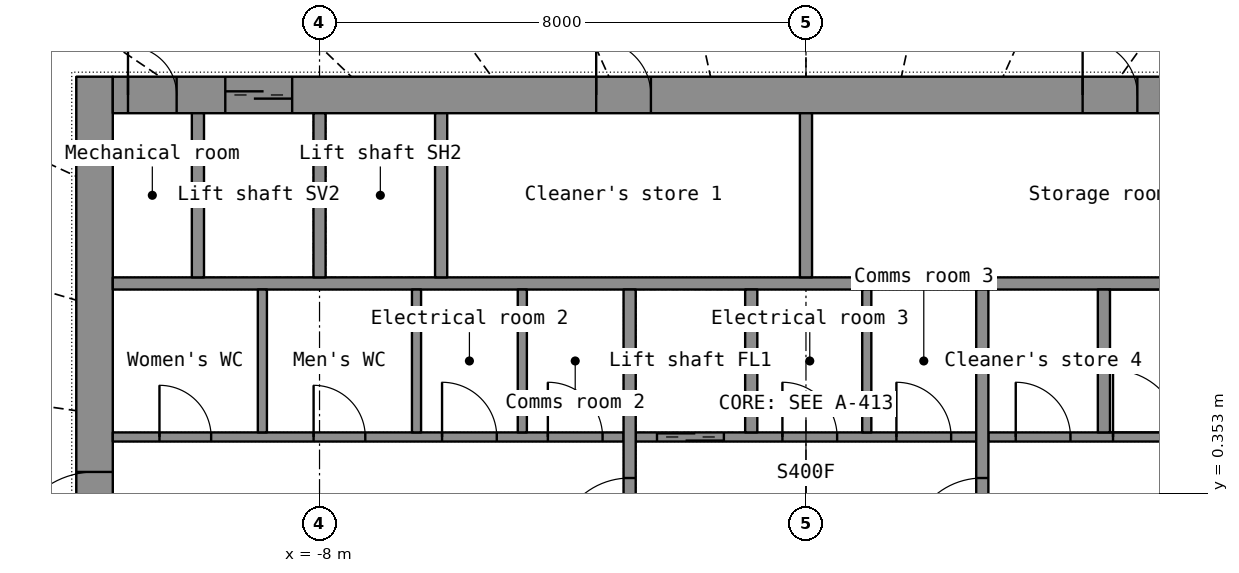
"""IFC4 building model, lengths in metres.
Left out: names, types, materials, properties, quantities, classifications, styles, units other than length and angle.
Written with IfcOpenShell. Run it as: python <this file> out.ifc"""

import sys

from ifc_helpers import new_model, si_unit, direction, frame, frame_2d, origin, place, context, subcontext, project, spatial, rectangle, extrude, element, fill, save


model = new_model("IFC4")
c1 = context("Model", 3, precision=1e-05, world=origin(), true_north=direction((0.0, 1.0)))
c2 = subcontext(c1, "Body", "Model", "MODEL_VIEW")
j1 = project(units=[si_unit("LENGTHUNIT", "METRE"), si_unit("PLANEANGLEUNIT", "RADIAN")], contexts=[c1])
p1 = place(None, origin())
s1 = spatial("IfcSite", under=j1, at=p1, CompositionType="ELEMENT")
p2 = place(p1, origin())
s2 = spatial("IfcBuilding", under=s1, at=p2, CompositionType="ELEMENT")
p3 = place(p2, frame((0.0, 0.0, 85.2)))
s3 = spatial("IfcBuildingStorey", under=s2, at=p3, CompositionType="ELEMENT", Elevation=85.2)
p4 = place(p3, frame((-11.7, -7.2, 0.0), z_axis=(0.0, 0.0, 1.0), x_axis=(0.0, 1.0, 0.0)))
e1 = element("IfcWall", 1, at=p4, inside=s3, PredefinedType="SHEAR", context=c2, shape_type="SweptSolid", body=[
    extrude(rectangle(XDim=14.4, YDim=0.6, at=frame_2d((7.2, 0.0))), origin(), (0.0, 0.0, 1.0), 7.0),
])
p5 = place(p4, frame((6.5, 0.0, 0.0)))
e2 = element("IfcOpeningElement", 2, at=p5, cuts=e1, PredefinedType="OPENING", context=c2, shape_type="SweptSolid", body=[
    extrude(rectangle(XDim=1.4, YDim=2.2, at=frame_2d((0.7, 1.1))), frame((0.0, 0.31, 0.0), z_axis=(0.0, -1.0, 0.0), x_axis=(1.0, 0.0, 0.0)), (0.0, 0.0, 1.0), 0.62),
])
p6 = place(p3, frame((-11.4, 6.9, 0.0), z_axis=(0.0, 0.0, 1.0), x_axis=(1.0, 0.0, 0.0)))
e3 = element("IfcWall", 3, at=p6, inside=s3, PredefinedType="SHEAR", context=c2, shape_type="SweptSolid", body=[
    extrude(rectangle(XDim=22.8, YDim=0.6, at=frame_2d((11.4, 0.0))), origin(), (0.0, 0.0, 1.0), 7.0),
])
p7 = place(p6, frame((1.85, 0.0, 0.0)))
e4 = element("IfcOpeningElement", 4, at=p7, cuts=e3, PredefinedType="OPENING", context=c2, shape_type="SweptSolid", body=[
    extrude(rectangle(XDim=1.1, YDim=2.2, at=frame_2d((0.55, 1.1))), frame((0.0, 0.31, 0.0), z_axis=(0.0, -1.0, 0.0), x_axis=(1.0, 0.0, 0.0)), (0.0, 0.0, 1.0), 0.62),
])
p8 = place(p6, frame((7.95, 0.0, 0.0)))
e5 = element("IfcOpeningElement", 5, at=p8, cuts=e3, PredefinedType="OPENING", context=c2, shape_type="SweptSolid", body=[
    extrude(rectangle(XDim=0.9, YDim=2.1, at=frame_2d((0.45, 1.05))), frame((0.0, 0.31, 0.0), z_axis=(0.0, -1.0, 0.0), x_axis=(1.0, 0.0, 0.0)), (0.0, 0.0, 1.0), 0.62),
])
p9 = place(p6, frame((15.95, 0.0, 0.0)))
e6 = element("IfcOpeningElement", 6, at=p9, cuts=e3, PredefinedType="OPENING", context=c2, shape_type="SweptSolid", body=[
    extrude(rectangle(XDim=0.9, YDim=2.1, at=frame_2d((0.45, 1.05))), frame((0.0, 0.31, 0.0), z_axis=(0.0, -1.0, 0.0), x_axis=(1.0, 0.0, 0.0)), (0.0, 0.0, 1.0), 0.62),
])
p10 = place(p6, frame((0.25, 0.0, 0.0)))
e7 = element("IfcOpeningElement", 7, at=p10, cuts=e3, PredefinedType="OPENING", context=c2, shape_type="SweptSolid", body=[
    extrude(rectangle(XDim=0.8, YDim=2.05, at=frame_2d((0.4, 1.025))), frame((0.0, 0.31, 0.0), z_axis=(0.0, -1.0, 0.0), x_axis=(1.0, 0.0, 0.0)), (0.0, 0.0, 1.0), 0.62),
])
p11 = place(p6, frame((21.75, 0.0, 0.0)))
e8 = element("IfcOpeningElement", 8, at=p11, cuts=e3, PredefinedType="OPENING", context=c2, shape_type="SweptSolid", body=[
    extrude(rectangle(XDim=0.8, YDim=2.05, at=frame_2d((0.4, 1.025))), frame((0.0, 0.31, 0.0), z_axis=(0.0, -1.0, 0.0), x_axis=(1.0, 0.0, 0.0)), (0.0, 0.0, 1.0), 0.62),
])
p12 = place(p3, frame((-11.4, 3.8, 0.0), z_axis=(0.0, 0.0, 1.0), x_axis=(1.0, 0.0, 0.0)))
e9 = element("IfcWall", 9, at=p12, inside=s3, PredefinedType="SHEAR", context=c2, shape_type="SweptSolid", body=[
    extrude(rectangle(XDim=22.8, YDim=0.2, at=frame_2d((11.4, 0.0))), origin(), (0.0, 0.0, 1.0), 7.0),
])
for number, where, z_axis, x_axis in (
    (10, (-10.0, 3.9, 0.0), (0.0, 0.0, 1.0), (0.0, 1.0, 0.0)),
    (11, (-8.0, 3.9, 0.0), (0.0, 0.0, 1.0), (0.0, 1.0, 0.0)),
    (12, (-6.0, 3.9, 0.0), (0.0, 0.0, 1.0), (0.0, 1.0, 0.0)),
):
    element("IfcWall", number, at=place(p3, frame(where, z_axis=z_axis, x_axis=x_axis)), inside=s3, PredefinedType="SHEAR", context=c2, shape_type="SweptSolid", body=[
        extrude(rectangle(XDim=2.7, YDim=0.2, at=frame_2d((1.35, 0.0))), origin(), (0.0, 0.0, 1.0), 7.0),
    ])
p13 = place(p3, frame((0.0, 3.9, 0.0), z_axis=(0.0, 0.0, 1.0), x_axis=(0.0, 1.0, 0.0)))
e13 = element("IfcWall", 13, at=p13, inside=s3, PredefinedType="PARTITIONING", context=c2, shape_type="SweptSolid", body=[
    extrude(rectangle(XDim=2.7, YDim=0.2, at=frame_2d((1.35, 0.0))), origin(), (0.0, 0.0, 1.0), 7.0),
])
p14 = place(p3, frame((-11.4, 1.275, 0.0), z_axis=(0.0, 0.0, 1.0), x_axis=(1.0, 0.0, 0.0)))
e14 = element("IfcWall", 14, at=p14, inside=s3, PredefinedType="PARTITIONING", context=c2, shape_type="SweptSolid", body=[
    extrude(rectangle(XDim=8.4, YDim=0.15, at=frame_2d((4.2, 0.0))), origin(), (0.0, 0.0, 1.0), 7.0),
])
p15 = place(p14, frame((0.768, 0.0, 0.0)))
e15 = element("IfcOpeningElement", 15, at=p15, cuts=e14, PredefinedType="OPENING", context=c2, shape_type="SweptSolid", body=[
    extrude(rectangle(XDim=0.85, YDim=2.1, at=frame_2d((0.425, 1.05))), frame((0.0, 0.085, 0.0), z_axis=(0.0, -1.0, 0.0), x_axis=(1.0, 0.0, 0.0)), (0.0, 0.0, 1.0), 0.17),
])
p16 = place(p14, frame((3.302, 0.0, 0.0)))
e16 = element("IfcOpeningElement", 16, at=p16, cuts=e14, PredefinedType="OPENING", context=c2, shape_type="SweptSolid", body=[
    extrude(rectangle(XDim=0.85, YDim=2.1, at=frame_2d((0.425, 1.05))), frame((0.0, 0.085, 0.0), z_axis=(0.0, -1.0, 0.0), x_axis=(1.0, 0.0, 0.0)), (0.0, 0.0, 1.0), 0.17),
])
p17 = place(p14, frame((5.415, 0.0, 0.0)))
e17 = element("IfcOpeningElement", 17, at=p17, cuts=e14, PredefinedType="OPENING", context=c2, shape_type="SweptSolid", body=[
    extrude(rectangle(XDim=0.9, YDim=2.1, at=frame_2d((0.45, 1.05))), frame((0.0, 0.085, 0.0), z_axis=(0.0, -1.0, 0.0), x_axis=(1.0, 0.0, 0.0)), (0.0, 0.0, 1.0), 0.17),
])
p18 = place(p14, frame((7.155, 0.0, 0.0)))
e18 = element("IfcOpeningElement", 18, at=p18, cuts=e14, PredefinedType="OPENING", context=c2, shape_type="SweptSolid", body=[
    extrude(rectangle(XDim=0.9, YDim=2.1, at=frame_2d((0.45, 1.05))), frame((0.0, 0.085, 0.0), z_axis=(0.0, -1.0, 0.0), x_axis=(1.0, 0.0, 0.0)), (0.0, 0.0, 1.0), 0.17),
])
p19 = place(p3, frame((-2.8, 1.275, 0.0), z_axis=(0.0, 0.0, 1.0), x_axis=(1.0, 0.0, 0.0)))
e19 = element("IfcWall", 19, at=p19, inside=s3, PredefinedType="SHEAR", context=c2, shape_type="SweptSolid", body=[
    extrude(rectangle(XDim=5.6, YDim=0.15, at=frame_2d((2.8, 0.0))), origin(), (0.0, 0.0, 1.0), 7.0),
])
p20 = place(p19, frame((0.35, 0.0, 0.0)))
e20 = element("IfcOpeningElement", 20, at=p20, cuts=e19, PredefinedType="OPENING", context=c2, shape_type="SweptSolid", body=[
    extrude(rectangle(XDim=1.1, YDim=2.2, at=frame_2d((0.55, 1.1))), frame((0.0, 0.085, 0.0), z_axis=(0.0, -1.0, 0.0), x_axis=(1.0, 0.0, 0.0)), (0.0, 0.0, 1.0), 0.17),
])
p21 = place(p19, frame((2.413, 0.0, 0.0)))
e21 = element("IfcOpeningElement", 21, at=p21, cuts=e19, PredefinedType="OPENING", context=c2, shape_type="SweptSolid", body=[
    extrude(rectangle(XDim=0.9, YDim=2.1, at=frame_2d((0.45, 1.05))), frame((0.0, 0.085, 0.0), z_axis=(0.0, -1.0, 0.0), x_axis=(1.0, 0.0, 0.0)), (0.0, 0.0, 1.0), 0.17),
])
p22 = place(p19, frame((4.288, 0.0, 0.0)))
e22 = element("IfcOpeningElement", 22, at=p22, cuts=e19, PredefinedType="OPENING", context=c2, shape_type="SweptSolid", body=[
    extrude(rectangle(XDim=0.9, YDim=2.1, at=frame_2d((0.45, 1.05))), frame((0.0, 0.085, 0.0), z_axis=(0.0, -1.0, 0.0), x_axis=(1.0, 0.0, 0.0)), (0.0, 0.0, 1.0), 0.17),
])
p23 = place(p3, frame((3.0, 1.275, 0.0), z_axis=(0.0, 0.0, 1.0), x_axis=(1.0, 0.0, 0.0)))
e23 = element("IfcWall", 23, at=p23, inside=s3, PredefinedType="SHEAR", context=c2, shape_type="SweptSolid", body=[
    extrude(rectangle(XDim=8.4, YDim=0.15, at=frame_2d((4.2, 0.0))), origin(), (0.0, 0.0, 1.0), 7.0),
])
p24 = place(p23, frame((2.05, 0.0, 0.0)))
e24 = element("IfcOpeningElement", 24, at=p24, cuts=e23, PredefinedType="OPENING", context=c2, shape_type="SweptSolid", body=[
    extrude(rectangle(XDim=1.1, YDim=2.15, at=frame_2d((0.55, 1.075))), frame((0.0, 0.085, 0.0), z_axis=(0.0, -1.0, 0.0), x_axis=(1.0, 0.0, 0.0)), (0.0, 0.0, 1.0), 0.17),
])
p25 = place(p23, frame((0.45, 0.0, 0.0)))
e25 = element("IfcOpeningElement", 25, at=p25, cuts=e23, PredefinedType="OPENING", context=c2, shape_type="SweptSolid", body=[
    extrude(rectangle(XDim=0.9, YDim=2.1, at=frame_2d((0.45, 1.05))), frame((0.0, 0.085, 0.0), z_axis=(0.0, -1.0, 0.0), x_axis=(1.0, 0.0, 0.0)), (0.0, 0.0, 1.0), 0.17),
])
p26 = place(p3, frame((-2.9, -3.7, 0.0), z_axis=(0.0, 0.0, 1.0), x_axis=(0.0, 1.0, 0.0)))
e26 = element("IfcWall", 26, at=p26, inside=s3, PredefinedType="SHEAR", context=c2, shape_type="SweptSolid", body=[
    extrude(rectangle(XDim=7.4, YDim=0.2, at=frame_2d((3.7, 0.0))), origin(), (0.0, 0.0, 1.0), 7.0),
])
p27 = place(p26, frame((3.1, 0.0, 0.0)))
e27 = element("IfcOpeningElement", 27, at=p27, cuts=e26, PredefinedType="OPENING", context=c2, shape_type="SweptSolid", body=[
    extrude(rectangle(XDim=1.2, YDim=2.2, at=frame_2d((0.6, 1.1))), frame((0.0, 0.11, 0.0), z_axis=(0.0, -1.0, 0.0), x_axis=(1.0, 0.0, 0.0)), (0.0, 0.0, 1.0), 0.22),
])
p28 = place(p3, frame((2.9, -3.7, 0.0), z_axis=(0.0, 0.0, 1.0), x_axis=(0.0, 1.0, 0.0)))
e28 = element("IfcWall", 28, at=p28, inside=s3, PredefinedType="SHEAR", context=c2, shape_type="SweptSolid", body=[
    extrude(rectangle(XDim=7.4, YDim=0.2, at=frame_2d((3.7, 0.0))), origin(), (0.0, 0.0, 1.0), 7.0),
])
p29 = place(p28, frame((3.1, 0.0, 0.0)))
e29 = element("IfcOpeningElement", 29, at=p29, cuts=e28, PredefinedType="OPENING", context=c2, shape_type="SweptSolid", body=[
    extrude(rectangle(XDim=1.2, YDim=2.2, at=frame_2d((0.6, 1.1))), frame((0.0, 0.11, 0.0), z_axis=(0.0, -1.0, 0.0), x_axis=(1.0, 0.0, 0.0)), (0.0, 0.0, 1.0), 0.22),
])
for number, where, z_axis, x_axis in (
    (30, (-0.9, 1.35, 0.0), (0.0, 0.0, 1.0), (0.0, 1.0, 0.0)),
    (31, (4.9, 1.35, 0.0), (0.0, 0.0, 1.0), (0.0, 1.0, 0.0)),
):
    element("IfcWall", number, at=place(p3, frame(where, z_axis=z_axis, x_axis=x_axis)), inside=s3, PredefinedType="SHEAR", context=c2, shape_type="SweptSolid", body=[
        extrude(rectangle(XDim=2.35, YDim=0.2, at=frame_2d((1.175, 0.0))), origin(), (0.0, 0.0, 1.0), 7.0),
    ])
for number, where, z_axis, x_axis in (
    (32, (-8.94, 1.35, 0.0), (0.0, 0.0, 1.0), (0.0, 1.0, 0.0)),
    (33, (-6.405, 1.35, 0.0), (0.0, 0.0, 1.0), (0.0, 1.0, 0.0)),
    (34, (-4.665, 1.35, 0.0), (0.0, 0.0, 1.0), (0.0, 1.0, 0.0)),
    (35, (1.0, 1.35, 0.0), (0.0, 0.0, 1.0), (0.0, 1.0, 0.0)),
):
    element("IfcWall", number, at=place(p3, frame(where, z_axis=z_axis, x_axis=x_axis)), inside=s3, PredefinedType="PARTITIONING", context=c2, shape_type="SweptSolid", body=[
        extrude(rectangle(XDim=2.35, YDim=0.15, at=frame_2d((1.175, 0.0))), origin(), (0.0, 0.0, 1.0), 7.0),
    ])
p30 = place(p7, origin())
e36 = element("IfcDoor", 36, at=p30, inside=s3, OperationType="DOUBLE_DOOR_SLIDING", PredefinedType="DOOR", context=c2, shape_type="SweptSolid", body=[
    extrude(rectangle(XDim=1.1, YDim=2.2, at=frame_2d((0.55, 1.1))), frame((0.0, 0.025, 0.0), z_axis=(0.0, -1.0, 0.0), x_axis=(1.0, 0.0, 0.0)), (0.0, 0.0, 1.0), 0.05),
])
fill(e4, e36)
p31 = place(p8, origin())
e37 = element("IfcDoor", 37, at=p31, inside=s3, OperationType="SINGLE_SWING_LEFT", PredefinedType="DOOR", context=c2, shape_type="SweptSolid", body=[
    extrude(rectangle(XDim=0.9, YDim=2.1, at=frame_2d((0.45, 1.05))), frame((0.0, 0.025, 0.0), z_axis=(0.0, -1.0, 0.0), x_axis=(1.0, 0.0, 0.0)), (0.0, 0.0, 1.0), 0.05),
])
fill(e5, e37)
p32 = place(p9, origin())
e38 = element("IfcDoor", 38, at=p32, inside=s3, OperationType="SINGLE_SWING_LEFT", PredefinedType="DOOR", context=c2, shape_type="SweptSolid", body=[
    extrude(rectangle(XDim=0.9, YDim=2.1, at=frame_2d((0.45, 1.05))), frame((0.0, 0.025, 0.0), z_axis=(0.0, -1.0, 0.0), x_axis=(1.0, 0.0, 0.0)), (0.0, 0.0, 1.0), 0.05),
])
fill(e6, e38)
p33 = place(p10, origin())
e39 = element("IfcDoor", 39, at=p33, inside=s3, OperationType="SINGLE_SWING_LEFT", PredefinedType="DOOR", context=c2, shape_type="SweptSolid", body=[
    extrude(rectangle(XDim=0.8, YDim=2.05, at=frame_2d((0.4, 1.025))), frame((0.0, 0.025, 0.0), z_axis=(0.0, -1.0, 0.0), x_axis=(1.0, 0.0, 0.0)), (0.0, 0.0, 1.0), 0.05),
])
fill(e7, e39)
p34 = place(p5, origin())
e40 = element("IfcDoor", 40, at=p34, inside=s3, OperationType="DOUBLE_DOOR_SINGLE_SWING", PredefinedType="DOOR", context=c2, shape_type="SweptSolid", body=[
    extrude(rectangle(XDim=1.4, YDim=2.2, at=frame_2d((0.7, 1.1))), frame((0.0, 0.025, 0.0), z_axis=(0.0, -1.0, 0.0), x_axis=(1.0, 0.0, 0.0)), (0.0, 0.0, 1.0), 0.05),
])
fill(e2, e40)
p35 = place(p27, origin())
e41 = element("IfcDoor", 41, at=p35, inside=s3, OperationType="SINGLE_SWING_LEFT", PredefinedType="DOOR", context=c2, shape_type="SweptSolid", body=[
    extrude(rectangle(XDim=1.2, YDim=2.2, at=frame_2d((0.6, 1.1))), frame((0.0, 0.025, 0.0), z_axis=(0.0, -1.0, 0.0), x_axis=(1.0, 0.0, 0.0)), (0.0, 0.0, 1.0), 0.05),
])
fill(e27, e41)
p36 = place(p29, origin())
e42 = element("IfcDoor", 42, at=p36, inside=s3, OperationType="SINGLE_SWING_LEFT", PredefinedType="DOOR", context=c2, shape_type="SweptSolid", body=[
    extrude(rectangle(XDim=1.2, YDim=2.2, at=frame_2d((0.6, 1.1))), frame((0.0, 0.025, 0.0), z_axis=(0.0, -1.0, 0.0), x_axis=(1.0, 0.0, 0.0)), (0.0, 0.0, 1.0), 0.05),
])
fill(e29, e42)
p37 = place(p20, origin())
e43 = element("IfcDoor", 43, at=p37, inside=s3, OperationType="DOUBLE_DOOR_SLIDING", PredefinedType="DOOR", context=c2, shape_type="SweptSolid", body=[
    extrude(rectangle(XDim=1.1, YDim=2.2, at=frame_2d((0.55, 1.1))), frame((0.0, 0.025, 0.0), z_axis=(0.0, -1.0, 0.0), x_axis=(1.0, 0.0, 0.0)), (0.0, 0.0, 1.0), 0.05),
])
fill(e20, e43)
p38 = place(p24, origin())
e44 = element("IfcDoor", 44, at=p38, inside=s3, OperationType="SINGLE_SWING_LEFT", PredefinedType="DOOR", context=c2, shape_type="SweptSolid", body=[
    extrude(rectangle(XDim=1.1, YDim=2.15, at=frame_2d((0.55, 1.075))), frame((0.0, 0.025, 0.0), z_axis=(0.0, -1.0, 0.0), x_axis=(1.0, 0.0, 0.0)), (0.0, 0.0, 1.0), 0.05),
])
fill(e24, e44)
p39 = place(p15, origin())
e45 = element("IfcDoor", 45, at=p39, inside=s3, OperationType="SINGLE_SWING_LEFT", PredefinedType="DOOR", context=c2, shape_type="SweptSolid", body=[
    extrude(rectangle(XDim=0.85, YDim=2.1, at=frame_2d((0.425, 1.05))), frame((0.0, 0.025, 0.0), z_axis=(0.0, -1.0, 0.0), x_axis=(1.0, 0.0, 0.0)), (0.0, 0.0, 1.0), 0.05),
])
fill(e15, e45)
p40 = place(p16, origin())
e46 = element("IfcDoor", 46, at=p40, inside=s3, OperationType="SINGLE_SWING_LEFT", PredefinedType="DOOR", context=c2, shape_type="SweptSolid", body=[
    extrude(rectangle(XDim=0.85, YDim=2.1, at=frame_2d((0.425, 1.05))), frame((0.0, 0.025, 0.0), z_axis=(0.0, -1.0, 0.0), x_axis=(1.0, 0.0, 0.0)), (0.0, 0.0, 1.0), 0.05),
])
fill(e16, e46)
p41 = place(p17, origin())
e47 = element("IfcDoor", 47, at=p41, inside=s3, OperationType="SINGLE_SWING_LEFT", PredefinedType="DOOR", context=c2, shape_type="SweptSolid", body=[
    extrude(rectangle(XDim=0.9, YDim=2.1, at=frame_2d((0.45, 1.05))), frame((0.0, 0.025, 0.0), z_axis=(0.0, -1.0, 0.0), x_axis=(1.0, 0.0, 0.0)), (0.0, 0.0, 1.0), 0.05),
])
fill(e17, e47)
p42 = place(p18, origin())
e48 = element("IfcDoor", 48, at=p42, inside=s3, OperationType="SINGLE_SWING_LEFT", PredefinedType="DOOR", context=c2, shape_type="SweptSolid", body=[
    extrude(rectangle(XDim=0.9, YDim=2.1, at=frame_2d((0.45, 1.05))), frame((0.0, 0.025, 0.0), z_axis=(0.0, -1.0, 0.0), x_axis=(1.0, 0.0, 0.0)), (0.0, 0.0, 1.0), 0.05),
])
fill(e18, e48)
p43 = place(p21, origin())
e49 = element("IfcDoor", 49, at=p43, inside=s3, OperationType="SINGLE_SWING_LEFT", PredefinedType="DOOR", context=c2, shape_type="SweptSolid", body=[
    extrude(rectangle(XDim=0.9, YDim=2.1, at=frame_2d((0.45, 1.05))), frame((0.0, 0.025, 0.0), z_axis=(0.0, -1.0, 0.0), x_axis=(1.0, 0.0, 0.0)), (0.0, 0.0, 1.0), 0.05),
])
fill(e21, e49)
p44 = place(p22, origin())
e50 = element("IfcDoor", 50, at=p44, inside=s3, OperationType="SINGLE_SWING_LEFT", PredefinedType="DOOR", context=c2, shape_type="SweptSolid", body=[
    extrude(rectangle(XDim=0.9, YDim=2.1, at=frame_2d((0.45, 1.05))), frame((0.0, 0.025, 0.0), z_axis=(0.0, -1.0, 0.0), x_axis=(1.0, 0.0, 0.0)), (0.0, 0.0, 1.0), 0.05),
])
fill(e22, e50)
p45 = place(p25, origin())
e51 = element("IfcDoor", 51, at=p45, inside=s3, OperationType="SINGLE_SWING_LEFT", PredefinedType="DOOR", context=c2, shape_type="SweptSolid", body=[
    extrude(rectangle(XDim=0.9, YDim=2.1, at=frame_2d((0.45, 1.05))), frame((0.0, 0.025, 0.0), z_axis=(0.0, -1.0, 0.0), x_axis=(1.0, 0.0, 0.0)), (0.0, 0.0, 1.0), 0.05),
])
fill(e25, e51)
save(model, sys.argv[1])
